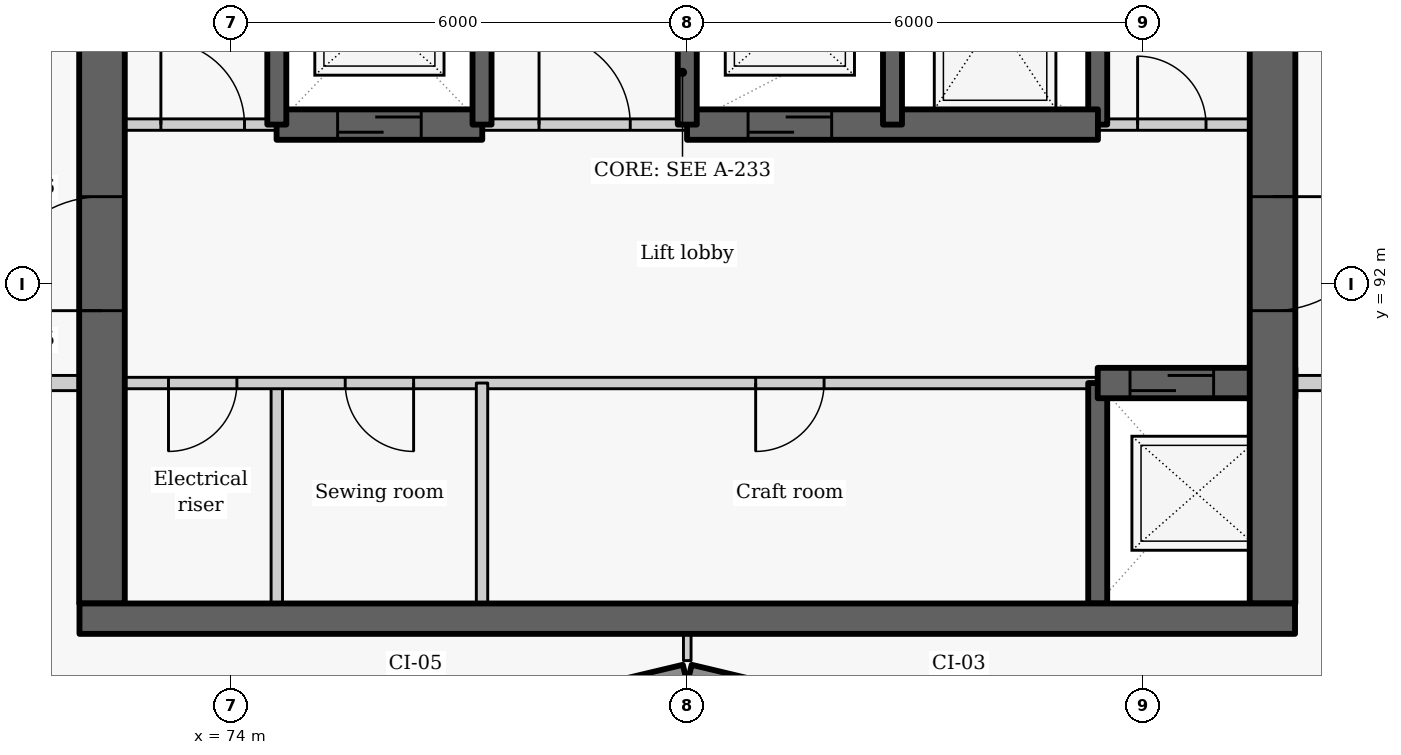
"""IFC4 building model, lengths in metres.
Left out: names, types, materials, properties, quantities, classifications, styles, units other than length and angle.
Written with IfcOpenShell. Run it as: python <this file> out.ifc"""

import sys

from ifc_helpers import new_model, si_unit, direction, frame, frame_2d, origin, place, context, subcontext, project, spatial, rectangle, extrude, element, fill, save


model = new_model("IFC4")
c1 = context("Model", 3, precision=1e-05, world=origin(), true_north=direction((0.0, 1.0)))
c2 = subcontext(c1, "Body", "Model", "MODEL_VIEW")
j1 = project(units=[si_unit("LENGTHUNIT", "METRE"), si_unit("PLANEANGLEUNIT", "RADIAN")], contexts=[c1])
p1 = place(None, origin())
s1 = spatial("IfcSite", under=j1, at=p1, CompositionType="ELEMENT")
p2 = place(p1, origin())
s2 = spatial("IfcBuilding", under=s1, at=p2, CompositionType="ELEMENT")
p3 = place(p2, frame((0.0, 0.0, 183.3)))
s3 = spatial("IfcBuildingStorey", under=s2, at=p3, CompositionType="ELEMENT", Elevation=183.3)
p4 = place(p3, frame((76.814, 86.119, 0.0), z_axis=(0.0, 0.0, 1.0), x_axis=(0.972773113459, 0.231759508395, 0.0)))
e1 = element("IfcWall", 1, at=p4, inside=s3, PredefinedType="SOLIDWALL", context=c2, shape_type="SweptSolid", body=[
    extrude(rectangle(XDim=3.246, YDim=0.25, at=frame_2d((1.623, 0.0))), origin(), (0.0, 0.0, 1.0), 2.425),
])
p5 = place(p4, frame((0.573, 0.0, 0.9)))
e2 = element("IfcOpeningElement", 2, at=p5, cuts=e1, PredefinedType="OPENING", context=c2, shape_type="SweptSolid", body=[
    extrude(rectangle(XDim=2.1, YDim=1.1, at=frame_2d((1.05, 0.55))), frame((0.0, 0.135, 0.0), z_axis=(0.0, -1.0, 0.0), x_axis=(1.0, 0.0, 0.0)), (0.0, 0.0, 1.0), 0.27),
])
p6 = place(p3, frame((80.029, 86.872, 0.0), z_axis=(0.0, 0.0, 1.0), x_axis=(0.972773113459, -0.231759508395, 0.0)))
e3 = element("IfcWall", 3, at=p6, inside=s3, PredefinedType="SOLIDWALL", context=c2, shape_type="SweptSolid", body=[
    extrude(rectangle(XDim=3.246, YDim=0.25, at=frame_2d((1.623, 0.0))), origin(), (0.0, 0.0, 1.0), 2.425),
])
p7 = place(p6, frame((0.573, 0.0, 0.9)))
e4 = element("IfcOpeningElement", 4, at=p7, cuts=e3, PredefinedType="OPENING", context=c2, shape_type="SweptSolid", body=[
    extrude(rectangle(XDim=2.1, YDim=1.1, at=frame_2d((1.05, 0.55))), frame((0.0, 0.135, 0.0), z_axis=(0.0, -1.0, 0.0), x_axis=(1.0, 0.0, 0.0)), (0.0, 0.0, 1.0), 0.27),
])
p8 = place(p3, frame((74.6, 87.8, 0.0), z_axis=(0.0, 0.0, 1.0), x_axis=(0.0, 1.0, 0.0)))
e5 = element("IfcWall", 5, at=p8, inside=s3, PredefinedType="PARTITIONING", context=c2, shape_type="SweptSolid", body=[
    extrude(rectangle(XDim=2.9, YDim=0.15, at=frame_2d((1.45, 0.0))), origin(), (0.0, 0.0, 1.0), 3.025),
])
p9 = place(p3, frame((85.4, 90.7, 0.0), z_axis=(0.0, 0.0, 1.0), x_axis=(-1.0, 0.0, 0.0)))
e6 = element("IfcWall", 6, at=p9, inside=s3, PredefinedType="PARTITIONING", context=c2, shape_type="SweptSolid", body=[
    extrude(rectangle(XDim=13.4, YDim=0.15, at=frame_2d((6.7, 0.0))), origin(), (0.0, 0.0, 1.0), 3.025),
])
p10 = place(p9, frame((11.325, 0.0, 0.0)))
e7 = element("IfcOpeningElement", 7, at=p10, cuts=e6, PredefinedType="OPENING", context=c2, shape_type="SweptSolid", body=[
    extrude(rectangle(XDim=0.9, YDim=2.1, at=frame_2d((0.45, 1.05))), frame((0.0, 0.085, 0.0), z_axis=(0.0, -1.0, 0.0), x_axis=(1.0, 0.0, 0.0)), (0.0, 0.0, 1.0), 0.17),
])
p11 = place(p9, frame((9.0, 0.0, 0.0)))
e8 = element("IfcOpeningElement", 8, at=p11, cuts=e6, PredefinedType="OPENING", context=c2, shape_type="SweptSolid", body=[
    extrude(rectangle(XDim=0.9, YDim=2.1, at=frame_2d((0.45, 1.05))), frame((0.0, 0.085, 0.0), z_axis=(0.0, -1.0, 0.0), x_axis=(1.0, 0.0, 0.0)), (0.0, 0.0, 1.0), 0.17),
])
p12 = place(p9, frame((3.6, 0.0, 0.0)))
e9 = element("IfcOpeningElement", 9, at=p12, cuts=e6, PredefinedType="OPENING", context=c2, shape_type="SweptSolid", body=[
    extrude(rectangle(XDim=0.9, YDim=2.1, at=frame_2d((0.45, 1.05))), frame((0.0, 0.085, 0.0), z_axis=(0.0, -1.0, 0.0), x_axis=(1.0, 0.0, 0.0)), (0.0, 0.0, 1.0), 0.17),
])
p13 = place(p3, frame((72.3, 87.8, -0.275), z_axis=(0.0, 0.0, 1.0), x_axis=(0.0, 1.0, 0.0)))
e10 = element("IfcWall", 10, at=p13, inside=s3, PredefinedType="SHEAR", context=c2, shape_type="SweptSolid", body=[
    extrude(rectangle(XDim=9.1, YDim=0.6, at=frame_2d((4.55, 0.0))), origin(), (0.0, 0.0, 1.0), 3.3),
])
p14 = place(p13, frame((3.852, 0.0, 0.275)))
e11 = element("IfcOpeningElement", 11, at=p14, cuts=e10, PredefinedType="OPENING", context=c2, shape_type="SweptSolid", body=[
    extrude(rectangle(XDim=1.5, YDim=2.1, at=frame_2d((0.75, 1.05))), frame((0.0, 0.31, 0.0), z_axis=(0.0, -1.0, 0.0), x_axis=(1.0, 0.0, 0.0)), (0.0, 0.0, 1.0), 0.62),
])
p15 = place(p3, frame((85.4, 87.8, -0.275), z_axis=(0.0, 0.0, 1.0), x_axis=(0.0, 1.0, 0.0)))
e12 = element("IfcWall", 12, at=p15, inside=s3, PredefinedType="SHEAR", context=c2, shape_type="SweptSolid", body=[
    extrude(rectangle(XDim=2.9, YDim=0.25, at=frame_2d((1.45, 0.0))), origin(), (0.0, 0.0, 1.0), 3.3),
])
p16 = place(p3, frame((85.4, 94.1, -0.275), z_axis=(0.0, 0.0, 1.0), x_axis=(0.0, 1.0, 0.0)))
e13 = element("IfcWall", 13, at=p16, inside=s3, PredefinedType="SHEAR", context=c2, shape_type="SweptSolid", body=[
    extrude(rectangle(XDim=2.8, YDim=0.25, at=frame_2d((1.4, 0.0))), origin(), (0.0, 0.0, 1.0), 3.3),
])
p17 = place(p3, frame((85.4, 90.7, -0.275), z_axis=(0.0, 0.0, 1.0), x_axis=(1.0, 0.0, 0.0)))
e14 = element("IfcWall", 14, at=p17, inside=s3, PredefinedType="SHEAR", context=c2, shape_type="SweptSolid", body=[
    extrude(rectangle(XDim=2.6, YDim=0.4, at=frame_2d((1.3, 0.0))), origin(), (0.0, 0.0, 1.0), 3.3),
])
p18 = place(p17, frame((0.425, 0.0, 0.275)))
e15 = element("IfcOpeningElement", 15, at=p18, cuts=e14, PredefinedType="OPENING", context=c2, shape_type="SweptSolid", body=[
    extrude(rectangle(XDim=1.1, YDim=2.1, at=frame_2d((0.55, 1.05))), frame((0.0, 0.21, 0.0), z_axis=(0.0, -1.0, 0.0), x_axis=(1.0, 0.0, 0.0)), (0.0, 0.0, 1.0), 0.42),
])
p19 = place(p3, frame((87.7, 102.05, -0.275), z_axis=(0.0, 0.0, 1.0), x_axis=(0.0, -1.0, 0.0)))
e16 = element("IfcWall", 16, at=p19, inside=s3, PredefinedType="SHEAR", context=c2, shape_type="SweptSolid", body=[
    extrude(rectangle(XDim=14.25, YDim=0.6, at=frame_2d((7.125, 0.0))), origin(), (0.0, 0.0, 1.0), 3.3),
])
p20 = place(p19, frame((8.898, 0.0, 0.275)))
e17 = element("IfcOpeningElement", 17, at=p20, cuts=e16, PredefinedType="OPENING", context=c2, shape_type="SweptSolid", body=[
    extrude(rectangle(XDim=1.5, YDim=2.1, at=frame_2d((0.75, 1.05))), frame((0.0, 0.31, 0.0), z_axis=(0.0, -1.0, 0.0), x_axis=(1.0, 0.0, 0.0)), (0.0, 0.0, 1.0), 0.62),
])
p21 = place(p3, frame((77.3, 87.8, 0.0), z_axis=(0.0, 0.0, 1.0), x_axis=(0.0, 1.0, 0.0)))
e18 = element("IfcWall", 18, at=p21, inside=s3, PredefinedType="PARTITIONING", context=c2, shape_type="SweptSolid", body=[
    extrude(rectangle(XDim=2.9, YDim=0.15, at=frame_2d((1.45, 0.0))), origin(), (0.0, 0.0, 1.0), 3.025),
])
p22 = place(p3, frame((72.0, 94.1, 0.0), z_axis=(0.0, 0.0, 1.0), x_axis=(1.0, 0.0, 0.0)))
e19 = element("IfcWall", 19, at=p22, inside=s3, PredefinedType="PARTITIONING", context=c2, shape_type="SweptSolid", body=[
    extrude(rectangle(XDim=2.603, YDim=0.15, at=frame_2d((1.302, 0.0))), origin(), (0.0, 0.0, 1.0), 3.025),
])
p23 = place(p22, frame((1.075, 0.0, 0.0)))
e20 = element("IfcOpeningElement", 20, at=p23, cuts=e19, PredefinedType="OPENING", context=c2, shape_type="SweptSolid", body=[
    extrude(rectangle(XDim=1.1, YDim=2.1, at=frame_2d((0.55, 1.05))), frame((0.0, 0.085, 0.0), z_axis=(0.0, -1.0, 0.0), x_axis=(1.0, 0.0, 0.0)), (0.0, 0.0, 1.0), 0.17),
])
p24 = place(p3, frame((77.297, 94.1, 0.0), z_axis=(0.0, 0.0, 1.0), x_axis=(1.0, 0.0, 0.0)))
e21 = element("IfcWall", 21, at=p24, inside=s3, PredefinedType="PARTITIONING", context=c2, shape_type="SweptSolid", body=[
    extrude(rectangle(XDim=2.706, YDim=0.15, at=frame_2d((1.353, 0.0))), origin(), (0.0, 0.0, 1.0), 3.025),
])
p25 = place(p24, frame((0.753, 0.0, 0.0)))
e22 = element("IfcOpeningElement", 22, at=p25, cuts=e21, PredefinedType="OPENING", context=c2, shape_type="SweptSolid", body=[
    extrude(rectangle(XDim=1.2, YDim=2.1, at=frame_2d((0.6, 1.05))), frame((0.0, 0.085, 0.0), z_axis=(0.0, -1.0, 0.0), x_axis=(1.0, 0.0, 0.0)), (0.0, 0.0, 1.0), 0.17),
])
p26 = place(p3, frame((85.397, 94.1, 0.0), z_axis=(0.0, 0.0, 1.0), x_axis=(1.0, 0.0, 0.0)))
e23 = element("IfcWall", 23, at=p26, inside=s3, PredefinedType="PARTITIONING", context=c2, shape_type="SweptSolid", body=[
    extrude(rectangle(XDim=2.603, YDim=0.15, at=frame_2d((1.302, 0.0))), origin(), (0.0, 0.0, 1.0), 3.025),
])
p27 = place(p26, frame((0.528, 0.0, 0.0)))
e24 = element("IfcOpeningElement", 24, at=p27, cuts=e23, PredefinedType="OPENING", context=c2, shape_type="SweptSolid", body=[
    extrude(rectangle(XDim=0.9, YDim=2.1, at=frame_2d((0.45, 1.05))), frame((0.0, 0.085, 0.0), z_axis=(0.0, -1.0, 0.0), x_axis=(1.0, 0.0, 0.0)), (0.0, 0.0, 1.0), 0.17),
])
p28 = place(p3, frame((74.597, 94.1, -0.275), z_axis=(0.0, 0.0, 1.0), x_axis=(1.0, 0.0, 0.0)))
e25 = element("IfcWall", 25, at=p28, inside=s3, PredefinedType="SHEAR", context=c2, shape_type="SweptSolid", body=[
    extrude(rectangle(XDim=2.706, YDim=0.4, at=frame_2d((1.353, 0.0))), origin(), (0.0, 0.0, 1.0), 3.3),
])
p29 = place(p28, frame((0.803, 0.0, 0.275)))
e26 = element("IfcOpeningElement", 26, at=p29, cuts=e25, PredefinedType="OPENING", context=c2, shape_type="SweptSolid", body=[
    extrude(rectangle(XDim=1.1, YDim=2.1, at=frame_2d((0.55, 1.05))), frame((0.0, 0.21, 0.0), z_axis=(0.0, -1.0, 0.0), x_axis=(1.0, 0.0, 0.0)), (0.0, 0.0, 1.0), 0.42),
])
p30 = place(p3, frame((79.997, 94.1, -0.275), z_axis=(0.0, 0.0, 1.0), x_axis=(1.0, 0.0, 0.0)))
e27 = element("IfcWall", 27, at=p30, inside=s3, PredefinedType="SHEAR", context=c2, shape_type="SweptSolid", body=[
    extrude(rectangle(XDim=5.406, YDim=0.4, at=frame_2d((2.703, 0.0))), origin(), (0.0, 0.0, 1.0), 3.3),
])
p31 = place(p30, frame((0.803, 0.0, 0.275)))
e28 = element("IfcOpeningElement", 28, at=p31, cuts=e27, PredefinedType="OPENING", context=c2, shape_type="SweptSolid", body=[
    extrude(rectangle(XDim=1.1, YDim=2.1, at=frame_2d((0.55, 1.05))), frame((0.0, 0.21, 0.0), z_axis=(0.0, -1.0, 0.0), x_axis=(1.0, 0.0, 0.0)), (0.0, 0.0, 1.0), 0.42),
])
for number, where, z_axis, x_axis in (
    (29, (74.6, 94.1, -0.275), (0.0, 0.0, 1.0), (0.0, 1.0, 0.0)),
    (30, (77.3, 94.1, -0.275), (0.0, 0.0, 1.0), (0.0, 1.0, 0.0)),
    (31, (80.0, 94.1, -0.275), (0.0, 0.0, 1.0), (0.0, 1.0, 0.0)),
    (32, (82.7, 94.1, -0.275), (0.0, 0.0, 1.0), (0.0, 1.0, 0.0)),
):
    element("IfcWall", number, at=place(p3, frame(where, z_axis=z_axis, x_axis=x_axis)), inside=s3, PredefinedType="SHEAR", context=c2, shape_type="SweptSolid", body=[
        extrude(rectangle(XDim=2.8, YDim=0.25, at=frame_2d((1.4, 0.0))), origin(), (0.0, 0.0, 1.0), 3.3),
    ])
for number, where, z_axis, x_axis in (
    (33, (70.45, 90.7, 0.0), (0.0, 0.0, 1.0), (1.0, 0.0, 0.0)),
    (34, (88.0, 90.7, 0.0), (0.0, 0.0, 1.0), (1.0, 0.0, 0.0)),
):
    element("IfcWall", number, at=place(p3, frame(where, z_axis=z_axis, x_axis=x_axis)), inside=s3, PredefinedType="PARTITIONING", context=c2, shape_type="SweptSolid", body=[
        extrude(rectangle(XDim=1.55, YDim=0.2, at=frame_2d((0.775, 0.0))), origin(), (0.0, 0.0, 1.0), 3.025),
    ])
p32 = place(p3, frame((80.0, 87.048, 0.0), z_axis=(0.0, 0.0, 1.0), x_axis=(0.0, 1.0, 0.0)))
e35 = element("IfcWall", 35, at=p32, inside=s3, PredefinedType="PARTITIONING", context=c2, shape_type="SweptSolid", body=[
    extrude(rectangle(XDim=0.352, YDim=0.1, at=frame_2d((0.176, 0.0))), origin(), (0.0, 0.0, 1.0), 3.025),
])
p33 = place(p3, frame((72.004, 87.6, -0.275), z_axis=(0.0, 0.0, 1.0), x_axis=(1.0, 0.0, 0.0)))
e36 = element("IfcWall", 36, at=p33, inside=s3, PredefinedType="SHEAR", context=c2, shape_type="SweptSolid", body=[
    extrude(rectangle(XDim=15.992, YDim=0.4, at=frame_2d((7.996, 0.0))), origin(), (0.0, 0.0, 1.0), 3.3),
])
p34 = place(p10, origin())
e37 = element("IfcDoor", 37, at=p34, inside=s3, OperationType="SINGLE_SWING_RIGHT", PredefinedType="DOOR", context=c2, shape_type="SweptSolid", body=[
    extrude(rectangle(XDim=0.9, YDim=2.1, at=frame_2d((0.45, 1.05))), frame((0.0, 0.025, 0.0), z_axis=(0.0, -1.0, 0.0), x_axis=(1.0, 0.0, 0.0)), (0.0, 0.0, 1.0), 0.05),
])
fill(e7, e37)
p35 = place(p18, origin())
e38 = element("IfcDoor", 38, at=p35, inside=s3, OperationType="SLIDING_TO_LEFT", PredefinedType="DOOR", context=c2, shape_type="SweptSolid", body=[
    extrude(rectangle(XDim=1.1, YDim=2.1, at=frame_2d((0.55, 1.05))), frame((0.0, 0.025, 0.0), z_axis=(0.0, -1.0, 0.0), x_axis=(1.0, 0.0, 0.0)), (0.0, 0.0, 1.0), 0.05),
])
fill(e15, e38)
p36 = place(p11, origin())
e39 = element("IfcDoor", 39, at=p36, inside=s3, OperationType="SINGLE_SWING_LEFT", PredefinedType="DOOR", context=c2, shape_type="SweptSolid", body=[
    extrude(rectangle(XDim=0.9, YDim=2.1, at=frame_2d((0.45, 1.05))), frame((0.0, 0.025, 0.0), z_axis=(0.0, -1.0, 0.0), x_axis=(1.0, 0.0, 0.0)), (0.0, 0.0, 1.0), 0.05),
])
fill(e8, e39)
p37 = place(p12, origin())
e40 = element("IfcDoor", 40, at=p37, inside=s3, OperationType="SINGLE_SWING_RIGHT", PredefinedType="DOOR", context=c2, shape_type="SweptSolid", body=[
    extrude(rectangle(XDim=0.9, YDim=2.1, at=frame_2d((0.45, 1.05))), frame((0.0, 0.025, 0.0), z_axis=(0.0, -1.0, 0.0), x_axis=(1.0, 0.0, 0.0)), (0.0, 0.0, 1.0), 0.05),
])
fill(e9, e40)
p38 = place(p23, origin())
e41 = element("IfcDoor", 41, at=p38, inside=s3, OperationType="SINGLE_SWING_LEFT", PredefinedType="DOOR", context=c2, shape_type="SweptSolid", body=[
    extrude(rectangle(XDim=1.1, YDim=2.1, at=frame_2d((0.55, 1.05))), frame((0.0, 0.025, 0.0), z_axis=(0.0, -1.0, 0.0), x_axis=(1.0, 0.0, 0.0)), (0.0, 0.0, 1.0), 0.05),
])
fill(e20, e41)
p39 = place(p29, origin())
e42 = element("IfcDoor", 42, at=p39, inside=s3, OperationType="SLIDING_TO_LEFT", PredefinedType="DOOR", context=c2, shape_type="SweptSolid", body=[
    extrude(rectangle(XDim=1.1, YDim=2.1, at=frame_2d((0.55, 1.05))), frame((0.0, 0.025, 0.0), z_axis=(0.0, -1.0, 0.0), x_axis=(1.0, 0.0, 0.0)), (0.0, 0.0, 1.0), 0.05),
])
fill(e26, e42)
p40 = place(p25, origin())
e43 = element("IfcDoor", 43, at=p40, inside=s3, OperationType="DOUBLE_DOOR_SINGLE_SWING", PredefinedType="DOOR", context=c2, shape_type="SweptSolid", body=[
    extrude(rectangle(XDim=1.2, YDim=2.1, at=frame_2d((0.6, 1.05))), frame((0.0, 0.025, 0.0), z_axis=(0.0, -1.0, 0.0), x_axis=(1.0, 0.0, 0.0)), (0.0, 0.0, 1.0), 0.05),
])
fill(e22, e43)
p41 = place(p31, origin())
e44 = element("IfcDoor", 44, at=p41, inside=s3, OperationType="SLIDING_TO_LEFT", PredefinedType="DOOR", context=c2, shape_type="SweptSolid", body=[
    extrude(rectangle(XDim=1.1, YDim=2.1, at=frame_2d((0.55, 1.05))), frame((0.0, 0.025, 0.0), z_axis=(0.0, -1.0, 0.0), x_axis=(1.0, 0.0, 0.0)), (0.0, 0.0, 1.0), 0.05),
])
fill(e28, e44)
p42 = place(p27, origin())
e45 = element("IfcDoor", 45, at=p42, inside=s3, OperationType="SINGLE_SWING_LEFT", PredefinedType="DOOR", context=c2, shape_type="SweptSolid", body=[
    extrude(rectangle(XDim=0.9, YDim=2.1, at=frame_2d((0.45, 1.05))), frame((0.0, 0.025, 0.0), z_axis=(0.0, -1.0, 0.0), x_axis=(1.0, 0.0, 0.0)), (0.0, 0.0, 1.0), 0.05),
])
fill(e24, e45)
p43 = place(p20, origin())
e46 = element("IfcDoor", 46, at=p43, inside=s3, OperationType="DOUBLE_DOOR_SINGLE_SWING", PredefinedType="DOOR", context=c2, shape_type="SweptSolid", body=[
    extrude(rectangle(XDim=1.5, YDim=2.1, at=frame_2d((0.75, 1.05))), frame((0.0, 0.025, 0.0), z_axis=(0.0, -1.0, 0.0), x_axis=(1.0, 0.0, 0.0)), (0.0, 0.0, 1.0), 0.05),
])
fill(e17, e46)
p44 = place(p14, origin())
e47 = element("IfcDoor", 47, at=p44, inside=s3, OperationType="DOUBLE_DOOR_SINGLE_SWING", PredefinedType="DOOR", context=c2, shape_type="SweptSolid", body=[
    extrude(rectangle(XDim=1.5, YDim=2.1, at=frame_2d((0.75, 1.05))), frame((0.0, 0.025, 0.0), z_axis=(0.0, -1.0, 0.0), x_axis=(1.0, 0.0, 0.0)), (0.0, 0.0, 1.0), 0.05),
])
fill(e11, e47)
save(model, sys.argv[1])
